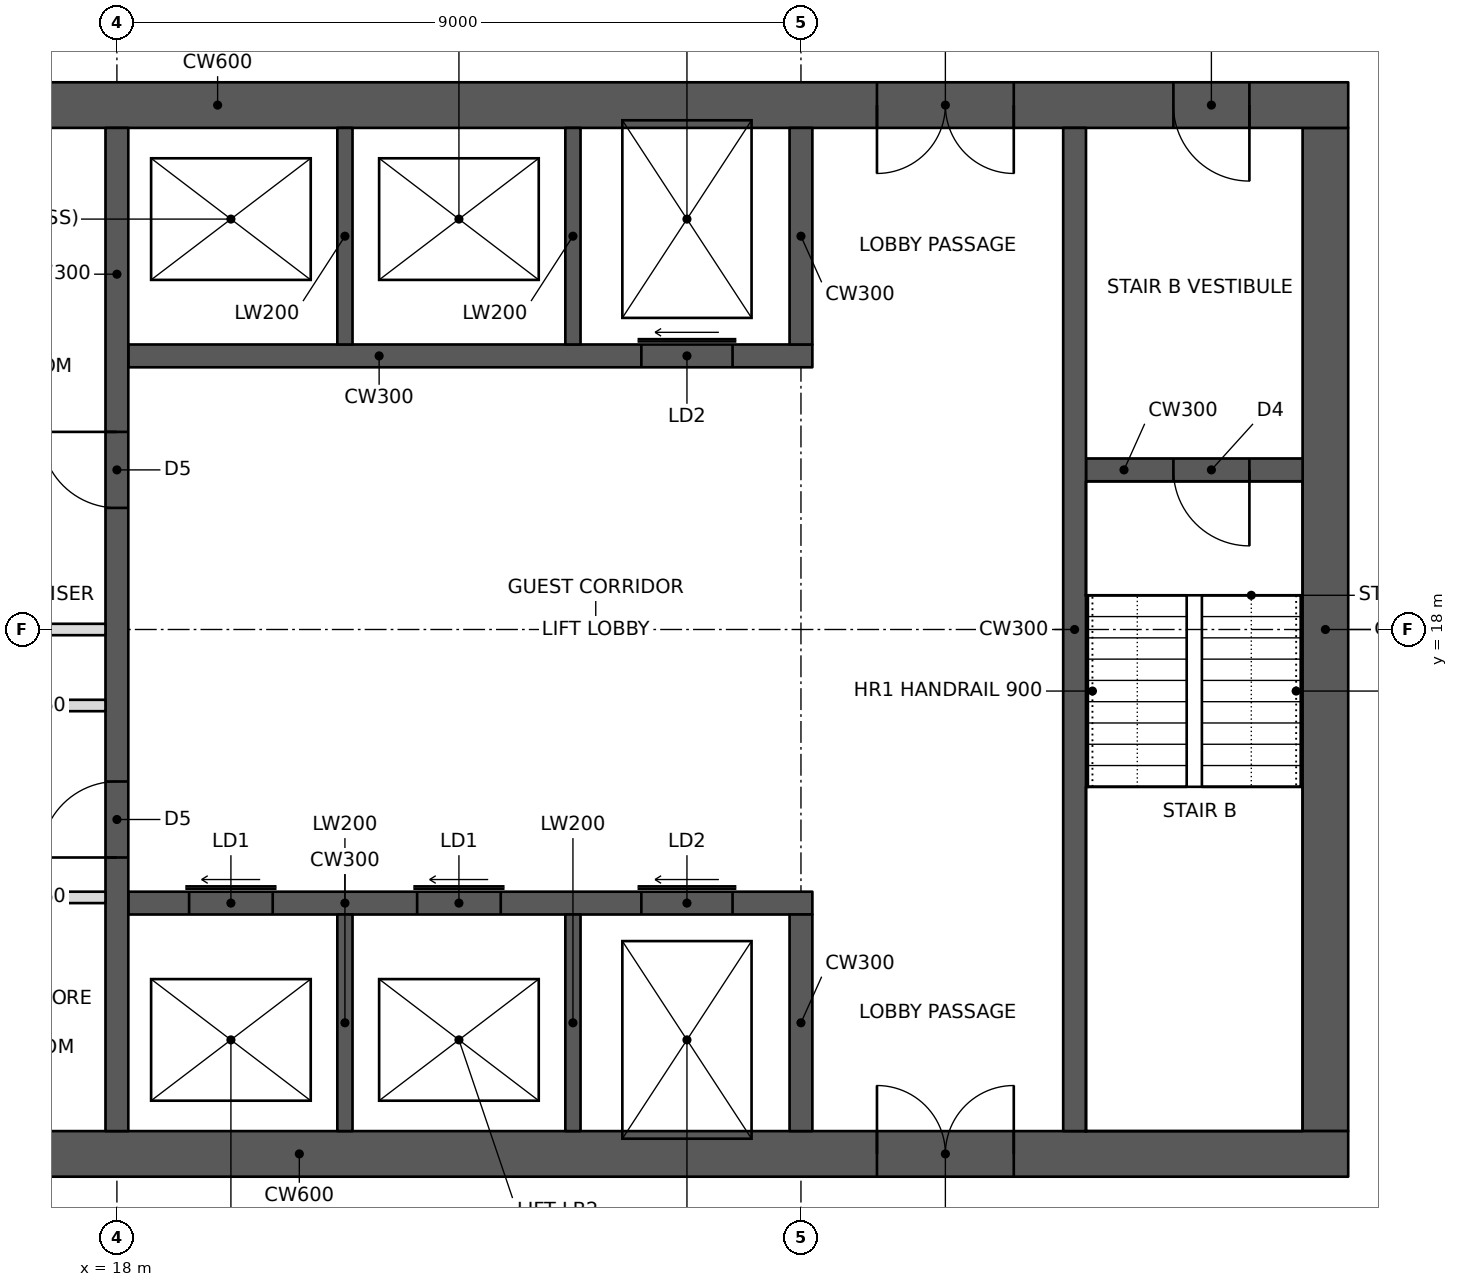
"""IFC4 building model, lengths in metres.
Left out: names, types, materials, properties, quantities, classifications, styles, units other than length and angle.
Written with IfcOpenShell. Run it as: python <this file> out.ifc"""

import sys

from ifc_helpers import new_model, si_unit, direction, frame, frame_2d, origin, place, context, subcontext, project, spatial, rectangle, extrude, element, fill, save


model = new_model("IFC4")
c1 = context("Model", 3, precision=1e-05, world=origin(), true_north=direction((0.0, 1.0)))
c2 = subcontext(c1, "Body", "Model", "MODEL_VIEW")
j1 = project(units=[si_unit("LENGTHUNIT", "METRE"), si_unit("PLANEANGLEUNIT", "RADIAN")], contexts=[c1])
p1 = place(None, origin())
s1 = spatial("IfcSite", under=j1, at=p1, CompositionType="ELEMENT")
p2 = place(p1, origin())
s2 = spatial("IfcBuilding", under=s1, at=p2, CompositionType="ELEMENT")
p3 = place(p2, frame((0.0, 0.0, 124.8)))
s3 = spatial("IfcBuildingStorey", under=s2, at=p3, CompositionType="ELEMENT", Elevation=124.8)
p4 = place(p3, frame((10.8, 11.1, 0.0), z_axis=(0.0, 0.0, 1.0), x_axis=(1.0, 0.0, 0.0)))
e1 = element("IfcWall", 1, at=p4, inside=s3, PredefinedType="SHEAR", context=c2, shape_type="SweptSolid", body=[
    extrude(rectangle(XDim=23.4, YDim=0.6, at=frame_2d((11.7, 0.0))), origin(), (0.0, 0.0, 1.0), 3.4),
])
p5 = place(p4, frame((1.0, 0.0, 0.0)))
e2 = element("IfcOpeningElement", 2, at=p5, cuts=e1, PredefinedType="OPENING", context=c2, shape_type="SweptSolid", body=[
    extrude(rectangle(XDim=1.0, YDim=2.1, at=frame_2d((0.5, 1.05))), frame((0.0, 0.31, 0.0), z_axis=(0.0, -1.0, 0.0), x_axis=(1.0, 0.0, 0.0)), (0.0, 0.0, 1.0), 0.62),
])
p6 = place(p4, frame((17.2, 0.0, 0.0)))
e3 = element("IfcOpeningElement", 3, at=p6, cuts=e1, PredefinedType="OPENING", context=c2, shape_type="SweptSolid", body=[
    extrude(rectangle(XDim=1.8, YDim=2.1, at=frame_2d((0.9, 1.05))), frame((0.0, 0.31, 0.0), z_axis=(0.0, -1.0, 0.0), x_axis=(1.0, 0.0, 0.0)), (0.0, 0.0, 1.0), 0.62),
])
p7 = place(p3, frame((10.8, 24.9, 0.0), z_axis=(0.0, 0.0, 1.0), x_axis=(1.0, 0.0, 0.0)))
e4 = element("IfcWall", 4, at=p7, inside=s3, PredefinedType="SHEAR", context=c2, shape_type="SweptSolid", body=[
    extrude(rectangle(XDim=23.4, YDim=0.6, at=frame_2d((11.7, 0.0))), origin(), (0.0, 0.0, 1.0), 3.4),
])
p8 = place(p7, frame((17.2, 0.0, 0.0)))
e5 = element("IfcOpeningElement", 5, at=p8, cuts=e4, PredefinedType="OPENING", context=c2, shape_type="SweptSolid", body=[
    extrude(rectangle(XDim=1.8, YDim=2.1, at=frame_2d((0.9, 1.05))), frame((0.0, 0.31, 0.0), z_axis=(0.0, -1.0, 0.0), x_axis=(1.0, 0.0, 0.0)), (0.0, 0.0, 1.0), 0.62),
])
p9 = place(p7, frame((21.1, 0.0, 0.0)))
e6 = element("IfcOpeningElement", 6, at=p9, cuts=e4, PredefinedType="OPENING", context=c2, shape_type="SweptSolid", body=[
    extrude(rectangle(XDim=1.0, YDim=2.1, at=frame_2d((0.5, 1.05))), frame((0.0, 0.31, 0.0), z_axis=(0.0, -1.0, 0.0), x_axis=(1.0, 0.0, 0.0)), (0.0, 0.0, 1.0), 0.62),
])
p10 = place(p3, frame((33.9, 11.4, 0.0), z_axis=(0.0, 0.0, 1.0), x_axis=(0.0, 1.0, 0.0)))
e7 = element("IfcWall", 7, at=p10, inside=s3, PredefinedType="SHEAR", context=c2, shape_type="SweptSolid", body=[
    extrude(rectangle(XDim=13.2, YDim=0.6, at=frame_2d((6.6, 0.0))), origin(), (0.0, 0.0, 1.0), 3.4),
])
p11 = place(p3, frame((18.0, 11.4, 0.0), z_axis=(0.0, 0.0, 1.0), x_axis=(0.0, 1.0, 0.0)))
e8 = element("IfcWall", 8, at=p11, inside=s3, PredefinedType="SHEAR", context=c2, shape_type="SweptSolid", body=[
    extrude(rectangle(XDim=13.2, YDim=0.3, at=frame_2d((6.6, 0.0))), origin(), (0.0, 0.0, 1.0), 3.4),
])
p12 = place(p11, frame((3.6, 0.0, 0.0)))
e9 = element("IfcOpeningElement", 9, at=p12, cuts=e8, PredefinedType="OPENING", context=c2, shape_type="SweptSolid", body=[
    extrude(rectangle(XDim=1.0, YDim=2.1, at=frame_2d((0.5, 1.05))), frame((0.0, 0.16, 0.0), z_axis=(0.0, -1.0, 0.0), x_axis=(1.0, 0.0, 0.0)), (0.0, 0.0, 1.0), 0.32),
])
p13 = place(p11, frame((8.2, 0.0, 0.0)))
e10 = element("IfcOpeningElement", 10, at=p13, cuts=e8, PredefinedType="OPENING", context=c2, shape_type="SweptSolid", body=[
    extrude(rectangle(XDim=1.0, YDim=2.1, at=frame_2d((0.5, 1.05))), frame((0.0, 0.16, 0.0), z_axis=(0.0, -1.0, 0.0), x_axis=(1.0, 0.0, 0.0)), (0.0, 0.0, 1.0), 0.32),
])
p14 = place(p3, frame((14.55, 18.0, 0.0), z_axis=(0.0, 0.0, 1.0), x_axis=(1.0, 0.0, 0.0)))
e11 = element("IfcWall", 11, at=p14, inside=s3, PredefinedType="PARTITIONING", context=c2, shape_type="SweptSolid", body=[
    extrude(rectangle(XDim=3.3, YDim=0.15, at=frame_2d((1.65, 0.0))), origin(), (0.0, 0.0, 1.0), 3.2),
])
p15 = place(p3, frame((18.15, 14.4, 0.0), z_axis=(0.0, 0.0, 1.0), x_axis=(1.0, 0.0, 0.0)))
e12 = element("IfcWall", 12, at=p15, inside=s3, PredefinedType="SHEAR", context=c2, shape_type="SweptSolid", body=[
    extrude(rectangle(XDim=9.0, YDim=0.3, at=frame_2d((4.5, 0.0))), origin(), (0.0, 0.0, 1.0), 3.4),
])
p16 = place(p15, frame((0.8, 0.0, 0.0)))
e13 = element("IfcOpeningElement", 13, at=p16, cuts=e12, PredefinedType="OPENING", context=c2, shape_type="SweptSolid", body=[
    extrude(rectangle(XDim=1.1, YDim=2.1, at=frame_2d((0.55, 1.05))), frame((0.0, 0.16, 0.0), z_axis=(0.0, -1.0, 0.0), x_axis=(1.0, 0.0, 0.0)), (0.0, 0.0, 1.0), 0.32),
])
p17 = place(p15, frame((3.8, 0.0, 0.0)))
e14 = element("IfcOpeningElement", 14, at=p17, cuts=e12, PredefinedType="OPENING", context=c2, shape_type="SweptSolid", body=[
    extrude(rectangle(XDim=1.1, YDim=2.1, at=frame_2d((0.55, 1.05))), frame((0.0, 0.16, 0.0), z_axis=(0.0, -1.0, 0.0), x_axis=(1.0, 0.0, 0.0)), (0.0, 0.0, 1.0), 0.32),
])
p18 = place(p15, frame((6.75, 0.0, 0.0)))
e15 = element("IfcOpeningElement", 15, at=p18, cuts=e12, PredefinedType="OPENING", context=c2, shape_type="SweptSolid", body=[
    extrude(rectangle(XDim=1.2, YDim=2.1, at=frame_2d((0.6, 1.05))), frame((0.0, 0.16, 0.0), z_axis=(0.0, -1.0, 0.0), x_axis=(1.0, 0.0, 0.0)), (0.0, 0.0, 1.0), 0.32),
])
p19 = place(p3, frame((27.0, 11.4, 0.0), z_axis=(0.0, 0.0, 1.0), x_axis=(0.0, 1.0, 0.0)))
e16 = element("IfcWall", 16, at=p19, inside=s3, PredefinedType="SHEAR", context=c2, shape_type="SweptSolid", body=[
    extrude(rectangle(XDim=2.85, YDim=0.3, at=frame_2d((1.425, 0.0))), origin(), (0.0, 0.0, 1.0), 3.4),
])
for number, where, z_axis, x_axis in (
    (17, (21.0, 11.4, 0.0), (0.0, 0.0, 1.0), (0.0, 1.0, 0.0)),
    (18, (24.0, 11.4, 0.0), (0.0, 0.0, 1.0), (0.0, 1.0, 0.0)),
):
    element("IfcWall", number, at=place(p3, frame(where, z_axis=z_axis, x_axis=x_axis)), inside=s3, PredefinedType="SHEAR", context=c2, shape_type="SweptSolid", body=[
        extrude(rectangle(XDim=2.85, YDim=0.2, at=frame_2d((1.425, 0.0))), origin(), (0.0, 0.0, 1.0), 3.4),
    ])
p20 = place(p3, frame((18.15, 21.6, 0.0), z_axis=(0.0, 0.0, 1.0), x_axis=(1.0, 0.0, 0.0)))
e19 = element("IfcWall", 19, at=p20, inside=s3, PredefinedType="SHEAR", context=c2, shape_type="SweptSolid", body=[
    extrude(rectangle(XDim=9.0, YDim=0.3, at=frame_2d((4.5, 0.0))), origin(), (0.0, 0.0, 1.0), 3.4),
])
p21 = place(p20, frame((6.75, 0.0, 0.0)))
e20 = element("IfcOpeningElement", 20, at=p21, cuts=e19, PredefinedType="OPENING", context=c2, shape_type="SweptSolid", body=[
    extrude(rectangle(XDim=1.2, YDim=2.1, at=frame_2d((0.6, 1.05))), frame((0.0, 0.16, 0.0), z_axis=(0.0, -1.0, 0.0), x_axis=(1.0, 0.0, 0.0)), (0.0, 0.0, 1.0), 0.32),
])
p22 = place(p3, frame((27.0, 21.75, 0.0), z_axis=(0.0, 0.0, 1.0), x_axis=(0.0, 1.0, 0.0)))
e21 = element("IfcWall", 21, at=p22, inside=s3, PredefinedType="SHEAR", context=c2, shape_type="SweptSolid", body=[
    extrude(rectangle(XDim=2.85, YDim=0.3, at=frame_2d((1.425, 0.0))), origin(), (0.0, 0.0, 1.0), 3.4),
])
for number, where, z_axis, x_axis in (
    (22, (21.0, 21.75, 0.0), (0.0, 0.0, 1.0), (0.0, 1.0, 0.0)),
    (23, (24.0, 21.75, 0.0), (0.0, 0.0, 1.0), (0.0, 1.0, 0.0)),
):
    element("IfcWall", number, at=place(p3, frame(where, z_axis=z_axis, x_axis=x_axis)), inside=s3, PredefinedType="SHEAR", context=c2, shape_type="SweptSolid", body=[
        extrude(rectangle(XDim=2.85, YDim=0.2, at=frame_2d((1.425, 0.0))), origin(), (0.0, 0.0, 1.0), 3.4),
    ])
p23 = place(p3, frame((30.6, 11.4, 0.0), z_axis=(0.0, 0.0, 1.0), x_axis=(0.0, 1.0, 0.0)))
e24 = element("IfcWall", 24, at=p23, inside=s3, PredefinedType="SHEAR", context=c2, shape_type="SweptSolid", body=[
    extrude(rectangle(XDim=13.2, YDim=0.3, at=frame_2d((6.6, 0.0))), origin(), (0.0, 0.0, 1.0), 3.4),
])
p24 = place(p3, frame((30.75, 20.1, 0.0), z_axis=(0.0, 0.0, 1.0), x_axis=(1.0, 0.0, 0.0)))
e25 = element("IfcWall", 25, at=p24, inside=s3, PredefinedType="SHEAR", context=c2, shape_type="SweptSolid", body=[
    extrude(rectangle(XDim=2.85, YDim=0.3, at=frame_2d((1.425, 0.0))), origin(), (0.0, 0.0, 1.0), 3.4),
])
p25 = place(p24, frame((1.15, 0.0, 0.0)))
e26 = element("IfcOpeningElement", 26, at=p25, cuts=e25, PredefinedType="OPENING", context=c2, shape_type="SweptSolid", body=[
    extrude(rectangle(XDim=1.0, YDim=2.1, at=frame_2d((0.5, 1.05))), frame((0.0, 0.16, 0.0), z_axis=(0.0, -1.0, 0.0), x_axis=(1.0, 0.0, 0.0)), (0.0, 0.0, 1.0), 0.32),
])
p26 = place(p3, frame((14.55, 17.0, 0.0), z_axis=(0.0, 0.0, 1.0), x_axis=(1.0, 0.0, 0.0)))
e27 = element("IfcWall", 27, at=p26, inside=s3, PredefinedType="PARTITIONING", context=c2, shape_type="SweptSolid", body=[
    extrude(rectangle(XDim=3.3, YDim=0.15, at=frame_2d((1.65, 0.0))), origin(), (0.0, 0.0, 1.0), 3.2),
])
p27 = place(p26, frame((0.3, 0.0, 0.0)))
e28 = element("IfcOpeningElement", 28, at=p27, cuts=e27, PredefinedType="OPENING", context=c2, shape_type="SweptSolid", body=[
    extrude(rectangle(XDim=1.0, YDim=2.1, at=frame_2d((0.5, 1.05))), frame((0.0, 0.085, 0.0), z_axis=(0.0, -1.0, 0.0), x_axis=(1.0, 0.0, 0.0)), (0.0, 0.0, 1.0), 0.17),
])
p28 = place(p3, frame((14.55, 14.475, 0.0), z_axis=(0.0, 0.0, 1.0), x_axis=(1.0, 0.0, 0.0)))
e29 = element("IfcWall", 29, at=p28, inside=s3, PredefinedType="PARTITIONING", context=c2, shape_type="SweptSolid", body=[
    extrude(rectangle(XDim=3.3, YDim=0.15, at=frame_2d((1.65, 0.0))), origin(), (0.0, 0.0, 1.0), 3.2),
])
p29 = place(p28, frame((0.3, 0.0, 0.0)))
e30 = element("IfcOpeningElement", 30, at=p29, cuts=e29, PredefinedType="OPENING", context=c2, shape_type="SweptSolid", body=[
    extrude(rectangle(XDim=1.0, YDim=2.1, at=frame_2d((0.5, 1.05))), frame((0.0, 0.085, 0.0), z_axis=(0.0, -1.0, 0.0), x_axis=(1.0, 0.0, 0.0)), (0.0, 0.0, 1.0), 0.17),
])
p30 = place(p6, origin())
e31 = element("IfcDoor", 31, at=p30, inside=s3, OperationType="DOUBLE_DOOR_SINGLE_SWING", PredefinedType="DOOR", context=c2, shape_type="SweptSolid", body=[
    extrude(rectangle(XDim=1.8, YDim=2.1, at=frame_2d((0.9, 1.05))), frame((0.0, 0.025, 0.0), z_axis=(0.0, -1.0, 0.0), x_axis=(1.0, 0.0, 0.0)), (0.0, 0.0, 1.0), 0.05),
])
fill(e3, e31)
p31 = place(p8, frame((1.8, 0.0, 0.0), z_axis=(0.0, 0.0, 1.0), x_axis=(-1.0, 0.0, 0.0)))
e32 = element("IfcDoor", 32, at=p31, inside=s3, OperationType="DOUBLE_DOOR_SINGLE_SWING", PredefinedType="DOOR", context=c2, shape_type="SweptSolid", body=[
    extrude(rectangle(XDim=1.8, YDim=2.1, at=frame_2d((0.9, 1.05))), frame((0.0, 0.025, 0.0), z_axis=(0.0, -1.0, 0.0), x_axis=(1.0, 0.0, 0.0)), (0.0, 0.0, 1.0), 0.05),
])
fill(e5, e32)
p32 = place(p9, frame((1.0, 0.0, 0.0), z_axis=(0.0, 0.0, 1.0), x_axis=(-1.0, 0.0, 0.0)))
e33 = element("IfcDoor", 33, at=p32, inside=s3, OperationType="SINGLE_SWING_LEFT", PredefinedType="DOOR", context=c2, shape_type="SweptSolid", body=[
    extrude(rectangle(XDim=1.0, YDim=2.1, at=frame_2d((0.5, 1.05))), frame((0.0, 0.025, 0.0), z_axis=(0.0, -1.0, 0.0), x_axis=(1.0, 0.0, 0.0)), (0.0, 0.0, 1.0), 0.05),
])
fill(e6, e33)
p33 = place(p25, frame((1.0, 0.0, 0.0), z_axis=(0.0, 0.0, 1.0), x_axis=(-1.0, 0.0, 0.0)))
e34 = element("IfcDoor", 34, at=p33, inside=s3, OperationType="SINGLE_SWING_LEFT", PredefinedType="DOOR", context=c2, shape_type="SweptSolid", body=[
    extrude(rectangle(XDim=1.0, YDim=2.1, at=frame_2d((0.5, 1.05))), frame((0.0, 0.025, 0.0), z_axis=(0.0, -1.0, 0.0), x_axis=(1.0, 0.0, 0.0)), (0.0, 0.0, 1.0), 0.05),
])
fill(e26, e34)
p34 = place(p12, origin())
e35 = element("IfcDoor", 35, at=p34, inside=s3, OperationType="SINGLE_SWING_LEFT", PredefinedType="DOOR", context=c2, shape_type="SweptSolid", body=[
    extrude(rectangle(XDim=1.0, YDim=2.1, at=frame_2d((0.5, 1.05))), frame((0.0, 0.025, 0.0), z_axis=(0.0, -1.0, 0.0), x_axis=(1.0, 0.0, 0.0)), (0.0, 0.0, 1.0), 0.05),
])
fill(e9, e35)
p35 = place(p13, origin())
e36 = element("IfcDoor", 36, at=p35, inside=s3, OperationType="SINGLE_SWING_RIGHT", PredefinedType="DOOR", context=c2, shape_type="SweptSolid", body=[
    extrude(rectangle(XDim=1.0, YDim=2.1, at=frame_2d((0.5, 1.05))), frame((0.0, 0.025, 0.0), z_axis=(0.0, -1.0, 0.0), x_axis=(1.0, 0.0, 0.0)), (0.0, 0.0, 1.0), 0.05),
])
fill(e10, e36)
p36 = place(p16, origin())
e37 = element("IfcDoor", 37, at=p36, inside=s3, OperationType="SLIDING_TO_LEFT", PredefinedType="DOOR", context=c2, shape_type="SweptSolid", body=[
    extrude(rectangle(XDim=1.1, YDim=2.1, at=frame_2d((0.55, 1.05))), frame((0.0, 0.025, 0.0), z_axis=(0.0, -1.0, 0.0), x_axis=(1.0, 0.0, 0.0)), (0.0, 0.0, 1.0), 0.05),
])
fill(e13, e37)
p37 = place(p17, origin())
e38 = element("IfcDoor", 38, at=p37, inside=s3, OperationType="SLIDING_TO_LEFT", PredefinedType="DOOR", context=c2, shape_type="SweptSolid", body=[
    extrude(rectangle(XDim=1.1, YDim=2.1, at=frame_2d((0.55, 1.05))), frame((0.0, 0.025, 0.0), z_axis=(0.0, -1.0, 0.0), x_axis=(1.0, 0.0, 0.0)), (0.0, 0.0, 1.0), 0.05),
])
fill(e14, e38)
p38 = place(p18, origin())
e39 = element("IfcDoor", 39, at=p38, inside=s3, OperationType="SLIDING_TO_LEFT", PredefinedType="DOOR", context=c2, shape_type="SweptSolid", body=[
    extrude(rectangle(XDim=1.2, YDim=2.1, at=frame_2d((0.6, 1.05))), frame((0.0, 0.025, 0.0), z_axis=(0.0, -1.0, 0.0), x_axis=(1.0, 0.0, 0.0)), (0.0, 0.0, 1.0), 0.05),
])
fill(e15, e39)
p39 = place(p21, origin())
e40 = element("IfcDoor", 40, at=p39, inside=s3, OperationType="SLIDING_TO_LEFT", PredefinedType="DOOR", context=c2, shape_type="SweptSolid", body=[
    extrude(rectangle(XDim=1.2, YDim=2.1, at=frame_2d((0.6, 1.05))), frame((0.0, 0.025, 0.0), z_axis=(0.0, -1.0, 0.0), x_axis=(1.0, 0.0, 0.0)), (0.0, 0.0, 1.0), 0.05),
])
fill(e20, e40)
save(model, sys.argv[1])
